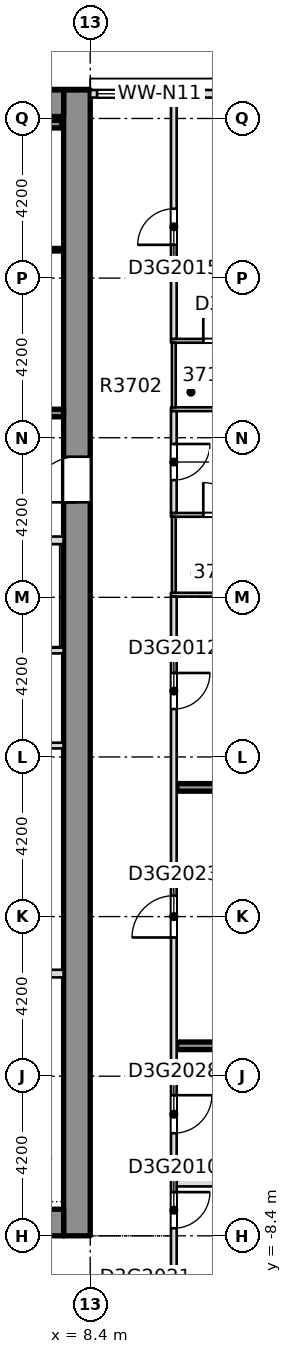
"""IFC4 building model, lengths in metres.
Left out: names, types, materials, properties, quantities, classifications, styles, units other than length and angle.
Written with IfcOpenShell. Run it as: python <this file> out.ifc"""

import sys

from ifc_helpers import new_model, si_unit, direction, frame, frame_2d, origin, place, context, subcontext, project, spatial, rectangle, extrude, element, fill, save


model = new_model("IFC4")
c1 = context("Model", 3, precision=1e-05, world=origin(), true_north=direction((0.0, 1.0)))
c2 = subcontext(c1, "Body", "Model", "MODEL_VIEW")
j1 = project(units=[si_unit("LENGTHUNIT", "METRE"), si_unit("PLANEANGLEUNIT", "RADIAN")], contexts=[c1])
p1 = place(None, origin())
s1 = spatial("IfcSite", under=j1, at=p1, CompositionType="ELEMENT")
p2 = place(p1, origin())
s2 = spatial("IfcBuilding", under=s1, at=p2, CompositionType="ELEMENT")
p3 = place(p2, frame((0.0, 0.0, 146.9)))
s3 = spatial("IfcBuildingStorey", under=s2, at=p3, CompositionType="ELEMENT", Elevation=146.9)
p4 = place(p3, frame((8.05, -8.4, -0.4), z_axis=(0.0, 0.0, 1.0), x_axis=(0.0, 1.0, 0.0)))
e1 = element("IfcWall", 1, at=p4, inside=s3, PredefinedType="SOLIDWALL", context=c2, shape_type="SweptSolid", body=[
    extrude(rectangle(XDim=30.15, YDim=0.7, at=frame_2d((15.075, 0.0))), origin(), (0.0, 0.0, 1.0), 3.45),
])
p5 = place(p4, frame((19.3, 0.0, 0.4)))
e2 = element("IfcOpeningElement", 2, at=p5, cuts=e1, PredefinedType="OPENING", context=c2, shape_type="SweptSolid", body=[
    extrude(rectangle(XDim=1.2, YDim=2.1, at=frame_2d((0.6, 1.05))), frame((0.0, 0.36, 0.0), z_axis=(0.0, -1.0, 0.0), x_axis=(1.0, 0.0, 0.0)), (0.0, 0.0, 1.0), 0.72),
])
p6 = place(p3, frame((-7.7, -8.05, -0.4), z_axis=(0.0, 0.0, 1.0), x_axis=(1.0, 0.0, 0.0)))
e3 = element("IfcWall", 3, at=p6, inside=s3, PredefinedType="SHEAR", context=c2, shape_type="SweptSolid", body=[
    extrude(rectangle(XDim=15.4, YDim=0.7, at=frame_2d((7.7, 0.0))), origin(), (0.0, 0.0, 1.0), 3.45),
])
p7 = place(p6, frame((2.95, 0.0, 0.4)))
e4 = element("IfcOpeningElement", 4, at=p7, cuts=e3, PredefinedType="OPENING", context=c2, shape_type="SweptSolid", body=[
    extrude(rectangle(XDim=1.8, YDim=2.1, at=frame_2d((0.9, 1.05))), frame((0.0, 0.36, 0.0), z_axis=(0.0, -1.0, 0.0), x_axis=(1.0, 0.0, 0.0)), (0.0, 0.0, 1.0), 0.72),
])
p8 = place(p6, frame((10.65, 0.0, 0.4)))
e5 = element("IfcOpeningElement", 5, at=p8, cuts=e3, PredefinedType="OPENING", context=c2, shape_type="SweptSolid", body=[
    extrude(rectangle(XDim=1.8, YDim=2.1, at=frame_2d((0.9, 1.05))), frame((0.0, 0.36, 0.0), z_axis=(0.0, -1.0, 0.0), x_axis=(1.0, 0.0, 0.0)), (0.0, 0.0, 1.0), 0.72),
])
p9 = place(p3, frame((-7.7, 21.4, -0.4), z_axis=(0.0, 0.0, 1.0), x_axis=(1.0, 0.0, 0.0)))
e6 = element("IfcWall", 6, at=p9, inside=s3, PredefinedType="SHEAR", context=c2, shape_type="SweptSolid", body=[
    extrude(rectangle(XDim=15.4, YDim=0.7, at=frame_2d((7.7, 0.0))), origin(), (0.0, 0.0, 1.0), 3.45),
])
p10 = place(p3, frame((10.675, -7.0, 0.0), z_axis=(0.0, 0.0, 1.0), x_axis=(1.0, 0.0, 0.0)))
e7 = element("IfcWall", 7, at=p10, inside=s3, PredefinedType="PARTITIONING", context=c2, shape_type="SweptSolid", body=[
    extrude(rectangle(XDim=10.875, YDim=0.2, at=frame_2d((5.438, 0.0))), origin(), (0.0, 0.0, 1.0), 3.05),
])
p11 = place(p3, frame((10.675, 3.4, 0.0), z_axis=(0.0, 0.0, 1.0), x_axis=(1.0, 0.0, 0.0)))
e8 = element("IfcWall", 8, at=p11, inside=s3, PredefinedType="SOLIDWALL", context=c2, shape_type="SweptSolid", body=[
    extrude(rectangle(XDim=9.773, YDim=0.2, at=frame_2d((4.886, 0.0))), origin(), (0.0, 0.0, 1.0), 3.05),
])
p12 = place(p3, frame((10.525, 8.47, 0.0), z_axis=(0.0, 0.0, 1.0), x_axis=(1.0, 0.0, 0.0)))
e9 = element("IfcWall", 9, at=p12, inside=s3, PredefinedType="PARTITIONING", context=c2, shape_type="SweptSolid", body=[
    extrude(rectangle(XDim=2.525, YDim=0.1, at=frame_2d((1.263, 0.0))), origin(), (0.0, 0.0, 1.0), 3.05),
])
p13 = place(p3, frame((10.525, 10.57, 0.0), z_axis=(0.0, 0.0, 1.0), x_axis=(1.0, 0.0, 0.0)))
e10 = element("IfcWall", 10, at=p13, inside=s3, PredefinedType="PARTITIONING", context=c2, shape_type="SweptSolid", body=[
    extrude(rectangle(XDim=2.525, YDim=0.1, at=frame_2d((1.263, 0.0))), origin(), (0.0, 0.0, 1.0), 3.05),
])
p14 = place(p13, frame((0.85, 0.0, 0.0)))
e11 = element("IfcOpeningElement", 11, at=p14, cuts=e10, PredefinedType="OPENING", context=c2, shape_type="SweptSolid", body=[
    extrude(rectangle(XDim=0.85, YDim=2.1, at=frame_2d((0.425, 1.05))), frame((0.0, 0.06, 0.0), z_axis=(0.0, -1.0, 0.0), x_axis=(1.0, 0.0, 0.0)), (0.0, 0.0, 1.0), 0.12),
])
p15 = place(p3, frame((10.525, 13.35, 0.0), z_axis=(0.0, 0.0, 1.0), x_axis=(1.0, 0.0, 0.0)))
e12 = element("IfcWall", 12, at=p15, inside=s3, PredefinedType="PARTITIONING", context=c2, shape_type="SweptSolid", body=[
    extrude(rectangle(XDim=2.525, YDim=0.1, at=frame_2d((1.263, 0.0))), origin(), (0.0, 0.0, 1.0), 3.05),
])
p16 = place(p3, frame((10.525, 15.15, 0.0), z_axis=(0.0, 0.0, 1.0), x_axis=(1.0, 0.0, 0.0)))
e13 = element("IfcWall", 13, at=p16, inside=s3, PredefinedType="PARTITIONING", context=c2, shape_type="SweptSolid", body=[
    extrude(rectangle(XDim=2.525, YDim=0.1, at=frame_2d((1.263, 0.0))), origin(), (0.0, 0.0, 1.0), 3.05),
])
p17 = place(p16, frame((0.85, 0.0, 0.0)))
e14 = element("IfcOpeningElement", 14, at=p17, cuts=e13, PredefinedType="OPENING", context=c2, shape_type="SweptSolid", body=[
    extrude(rectangle(XDim=0.85, YDim=2.1, at=frame_2d((0.425, 1.05))), frame((0.0, 0.06, 0.0), z_axis=(0.0, -1.0, 0.0), x_axis=(1.0, 0.0, 0.0)), (0.0, 0.0, 1.0), 0.12),
])
p18 = place(p3, frame((10.6, -10.33, 0.0), z_axis=(0.0, 0.0, 1.0), x_axis=(0.0, 1.0, 0.0)))
e15 = element("IfcWall", 15, at=p18, inside=s3, PredefinedType="PARTITIONING", context=c2, shape_type="SweptSolid", body=[
    extrude(rectangle(XDim=18.75, YDim=0.15, at=frame_2d((9.375, 0.0))), origin(), (0.0, 0.0, 1.0), 3.05),
])
p19 = place(p18, frame((2.13, 0.0, 0.0)))
e16 = element("IfcOpeningElement", 16, at=p19, cuts=e15, PredefinedType="OPENING", context=c2, shape_type="SweptSolid", body=[
    extrude(rectangle(XDim=0.95, YDim=2.1, at=frame_2d((0.475, 1.05))), frame((0.0, 0.085, 0.0), z_axis=(0.0, -1.0, 0.0), x_axis=(1.0, 0.0, 0.0)), (0.0, 0.0, 1.0), 0.17),
])
p20 = place(p18, frame((15.79, 0.0, 0.0)))
e17 = element("IfcOpeningElement", 17, at=p20, cuts=e15, PredefinedType="OPENING", context=c2, shape_type="SweptSolid", body=[
    extrude(rectangle(XDim=0.95, YDim=2.1, at=frame_2d((0.475, 1.05))), frame((0.0, 0.085, 0.0), z_axis=(0.0, -1.0, 0.0), x_axis=(1.0, 0.0, 0.0)), (0.0, 0.0, 1.0), 0.17),
])
p21 = place(p18, frame((9.78, 0.0, 0.0)))
e18 = element("IfcOpeningElement", 18, at=p21, cuts=e15, PredefinedType="OPENING", context=c2, shape_type="SweptSolid", body=[
    extrude(rectangle(XDim=1.1, YDim=2.1, at=frame_2d((0.55, 1.05))), frame((0.0, 0.085, 0.0), z_axis=(0.0, -1.0, 0.0), x_axis=(1.0, 0.0, 0.0)), (0.0, 0.0, 1.0), 0.17),
])
p22 = place(p18, frame((4.63, 0.0, 0.0)))
e19 = element("IfcOpeningElement", 19, at=p22, cuts=e15, PredefinedType="OPENING", context=c2, shape_type="SweptSolid", body=[
    extrude(rectangle(XDim=1.0, YDim=2.1, at=frame_2d((0.5, 1.05))), frame((0.0, 0.085, 0.0), z_axis=(0.0, -1.0, 0.0), x_axis=(1.0, 0.0, 0.0)), (0.0, 0.0, 1.0), 0.17),
])
p23 = place(p3, frame((10.6, 8.52, 0.0), z_axis=(0.0, 0.0, 1.0), x_axis=(0.0, 1.0, 0.0)))
e20 = element("IfcWall", 20, at=p23, inside=s3, PredefinedType="PARTITIONING", context=c2, shape_type="SweptSolid", body=[
    extrude(rectangle(XDim=2.0, YDim=0.1, at=frame_2d((1.0, 0.0))), origin(), (0.0, 0.0, 1.0), 3.05),
])
p24 = place(p3, frame((10.6, 10.62, 0.0), z_axis=(0.0, 0.0, 1.0), x_axis=(0.0, 1.0, 0.0)))
e21 = element("IfcWall", 21, at=p24, inside=s3, PredefinedType="PARTITIONING", context=c2, shape_type="SweptSolid", body=[
    extrude(rectangle(XDim=2.68, YDim=0.15, at=frame_2d((1.34, 0.0))), origin(), (0.0, 0.0, 1.0), 3.05),
])
p25 = place(p24, frame((0.865, 0.0, 0.0)))
e22 = element("IfcOpeningElement", 22, at=p25, cuts=e21, PredefinedType="OPENING", context=c2, shape_type="SweptSolid", body=[
    extrude(rectangle(XDim=0.95, YDim=2.1, at=frame_2d((0.475, 1.05))), frame((0.0, 0.085, 0.0), z_axis=(0.0, -1.0, 0.0), x_axis=(1.0, 0.0, 0.0)), (0.0, 0.0, 1.0), 0.17),
])
p26 = place(p3, frame((10.6, 13.4, 0.0), z_axis=(0.0, 0.0, 1.0), x_axis=(0.0, 1.0, 0.0)))
e23 = element("IfcWall", 23, at=p26, inside=s3, PredefinedType="PARTITIONING", context=c2, shape_type="SweptSolid", body=[
    extrude(rectangle(XDim=1.7, YDim=0.1, at=frame_2d((0.85, 0.0))), origin(), (0.0, 0.0, 1.0), 3.05),
])
p27 = place(p3, frame((10.6, 15.2, 0.0), z_axis=(0.0, 0.0, 1.0), x_axis=(0.0, 1.0, 0.0)))
e24 = element("IfcWall", 24, at=p27, inside=s3, PredefinedType="PARTITIONING", context=c2, shape_type="SweptSolid", body=[
    extrude(rectangle(XDim=6.35, YDim=0.15, at=frame_2d((3.175, 0.0))), origin(), (0.0, 0.0, 1.0), 3.05),
])
p28 = place(p27, frame((2.475, 0.0, 0.0)))
e25 = element("IfcOpeningElement", 25, at=p28, cuts=e24, PredefinedType="OPENING", context=c2, shape_type="SweptSolid", body=[
    extrude(rectangle(XDim=0.95, YDim=2.1, at=frame_2d((0.475, 1.05))), frame((0.0, 0.085, 0.0), z_axis=(0.0, -1.0, 0.0), x_axis=(1.0, 0.0, 0.0)), (0.0, 0.0, 1.0), 0.17),
])
p29 = place(p3, frame((12.05, 21.65, 0.0), z_axis=(0.0, 0.0, 1.0), x_axis=(-1.0, 0.0, 0.0)))
e26 = element("IfcWall", 26, at=p29, inside=s3, PredefinedType="STANDARD", context=c2, shape_type="SweptSolid", body=[
    extrude(rectangle(XDim=3.65, YDim=0.2, at=frame_2d((1.825, 0.0))), origin(), (0.0, 0.0, 1.0), 3.05),
])
p30 = place(p29, frame((1.67, 0.0, 0.2)))
e27 = element("IfcOpeningElement", 27, at=p30, cuts=e26, PredefinedType="OPENING", context=c2, shape_type="SweptSolid", body=[
    extrude(rectangle(XDim=1.8, YDim=2.65, at=frame_2d((0.9, 1.325))), frame((0.0, 0.11, 0.0), z_axis=(0.0, -1.0, 0.0), x_axis=(1.0, 0.0, 0.0)), (0.0, 0.0, 1.0), 0.22),
])
p31 = place(p3, frame((5.575, -1.5, 0.0), z_axis=(0.0, 0.0, 1.0), x_axis=(1.0, 0.0, 0.0)))
e28 = element("IfcWall", 28, at=p31, inside=s3, PredefinedType="PARTITIONING", context=c2, shape_type="SweptSolid", body=[
    extrude(rectangle(XDim=2.124, YDim=0.2, at=frame_2d((1.062, 0.0))), origin(), (0.0, 0.0, 1.0), 3.05),
])
p32 = place(p3, frame((5.425, 4.5, 0.0), z_axis=(0.0, 0.0, 1.0), x_axis=(1.0, 0.0, 0.0)))
e29 = element("IfcWall", 29, at=p32, inside=s3, PredefinedType="PARTITIONING", context=c2, shape_type="SweptSolid", body=[
    extrude(rectangle(XDim=2.274, YDim=0.15, at=frame_2d((1.137, 0.0))), origin(), (0.0, 0.0, 1.0), 3.05),
])
p33 = place(p3, frame((-7.699, 7.0, 0.0), z_axis=(0.0, 0.0, 1.0), x_axis=(1.0, 0.0, 0.0)))
e30 = element("IfcWall", 30, at=p33, inside=s3, PredefinedType="PARTITIONING", context=c2, shape_type="SweptSolid", body=[
    extrude(rectangle(XDim=15.398, YDim=0.15, at=frame_2d((7.699, 0.0))), origin(), (0.0, 0.0, 1.0), 3.05),
])
p34 = place(p33, frame((6.999, 0.0, 0.0)))
e31 = element("IfcOpeningElement", 31, at=p34, cuts=e30, PredefinedType="OPENING", context=c2, shape_type="SweptSolid", body=[
    extrude(rectangle(XDim=1.4, YDim=2.1, at=frame_2d((0.7, 1.05))), frame((0.0, 0.085, 0.0), z_axis=(0.0, -1.0, 0.0), x_axis=(1.0, 0.0, 0.0)), (0.0, 0.0, 1.0), 0.17),
])
p35 = place(p3, frame((3.6, 9.9, 0.0), z_axis=(0.0, 0.0, 1.0), x_axis=(1.0, 0.0, 0.0)))
e32 = element("IfcWall", 32, at=p35, inside=s3, PredefinedType="PARTITIONING", context=c2, shape_type="SweptSolid", body=[
    extrude(rectangle(XDim=4.099, YDim=0.2, at=frame_2d((2.049, 0.0))), origin(), (0.0, 0.0, 1.0), 3.05),
])
p36 = place(p35, frame((2.25, 0.0, 0.0)))
e33 = element("IfcOpeningElement", 33, at=p36, cuts=e32, PredefinedType="OPENING", context=c2, shape_type="SweptSolid", body=[
    extrude(rectangle(XDim=1.1, YDim=2.1, at=frame_2d((0.55, 1.05))), frame((0.0, 0.11, 0.0), z_axis=(0.0, -1.0, 0.0), x_axis=(1.0, 0.0, 0.0)), (0.0, 0.0, 1.0), 0.22),
])
p37 = place(p3, frame((3.425, 13.25, 0.0), z_axis=(0.0, 0.0, 1.0), x_axis=(1.0, 0.0, 0.0)))
e34 = element("IfcWall", 34, at=p37, inside=s3, PredefinedType="SOLIDWALL", context=c2, shape_type="SweptSolid", body=[
    extrude(rectangle(XDim=4.274, YDim=0.2, at=frame_2d((2.137, 0.0))), origin(), (0.0, 0.0, 1.0), 3.05),
])
p38 = place(p37, frame((1.825, 0.0, 0.0)))
e35 = element("IfcOpeningElement", 35, at=p38, cuts=e34, PredefinedType="OPENING", context=c2, shape_type="SweptSolid", body=[
    extrude(rectangle(XDim=1.2, YDim=2.1, at=frame_2d((0.6, 1.05))), frame((0.0, 0.11, 0.0), z_axis=(0.0, -1.0, 0.0), x_axis=(1.0, 0.0, 0.0)), (0.0, 0.0, 1.0), 0.22),
])
p39 = place(p3, frame((4.1, 20.85, 0.0), z_axis=(0.0, 0.0, 1.0), x_axis=(1.0, 0.0, 0.0)))
e36 = element("IfcWall", 36, at=p39, inside=s3, PredefinedType="SOLIDWALL", context=c2, shape_type="SweptSolid", body=[
    extrude(rectangle(XDim=3.55, YDim=0.2, at=frame_2d((1.775, 0.0))), origin(), (0.0, 0.0, 1.0), 3.05),
])
p40 = place(p3, frame((10.675, -3.4, 0.0), z_axis=(0.0, 0.0, 1.0), x_axis=(1.0, 0.0, 0.0)))
e37 = element("IfcWall", 37, at=p40, inside=s3, PredefinedType="SOLIDWALL", context=c2, shape_type="SweptSolid", body=[
    extrude(rectangle(XDim=10.875, YDim=0.2, at=frame_2d((5.438, 0.0))), origin(), (0.0, 0.0, 1.0), 3.05),
])
p41 = place(p19, origin())
e38 = element("IfcDoor", 38, at=p41, inside=s3, OperationType="SINGLE_SWING_LEFT", PredefinedType="DOOR", context=c2, shape_type="SweptSolid", body=[
    extrude(rectangle(XDim=0.95, YDim=2.1, at=frame_2d((0.475, 1.05))), frame((0.0, 0.025, 0.0), z_axis=(0.0, -1.0, 0.0), x_axis=(1.0, 0.0, 0.0)), (0.0, 0.0, 1.0), 0.05),
])
fill(e16, e38)
p42 = place(p20, origin())
e39 = element("IfcDoor", 39, at=p42, inside=s3, OperationType="SINGLE_SWING_RIGHT", PredefinedType="DOOR", context=c2, shape_type="SweptSolid", body=[
    extrude(rectangle(XDim=0.95, YDim=2.1, at=frame_2d((0.475, 1.05))), frame((0.0, 0.025, 0.0), z_axis=(0.0, -1.0, 0.0), x_axis=(1.0, 0.0, 0.0)), (0.0, 0.0, 1.0), 0.05),
])
fill(e17, e39)
p43 = place(p25, origin())
e40 = element("IfcDoor", 40, at=p43, inside=s3, OperationType="SINGLE_SWING_RIGHT", PredefinedType="DOOR", context=c2, shape_type="SweptSolid", body=[
    extrude(rectangle(XDim=0.95, YDim=2.1, at=frame_2d((0.475, 1.05))), frame((0.0, 0.025, 0.0), z_axis=(0.0, -1.0, 0.0), x_axis=(1.0, 0.0, 0.0)), (0.0, 0.0, 1.0), 0.05),
])
fill(e22, e40)
p44 = place(p14, origin())
e41 = element("IfcDoor", 41, at=p44, inside=s3, OperationType="SINGLE_SWING_RIGHT", PredefinedType="DOOR", context=c2, shape_type="SweptSolid", body=[
    extrude(rectangle(XDim=0.85, YDim=2.1, at=frame_2d((0.425, 1.05))), frame((0.0, 0.025, 0.0), z_axis=(0.0, -1.0, 0.0), x_axis=(1.0, 0.0, 0.0)), (0.0, 0.0, 1.0), 0.05),
])
fill(e11, e41)
p45 = place(p28, origin())
e42 = element("IfcDoor", 42, at=p45, inside=s3, OperationType="SINGLE_SWING_LEFT", PredefinedType="DOOR", context=c2, shape_type="SweptSolid", body=[
    extrude(rectangle(XDim=0.95, YDim=2.1, at=frame_2d((0.475, 1.05))), frame((0.0, 0.025, 0.0), z_axis=(0.0, -1.0, 0.0), x_axis=(1.0, 0.0, 0.0)), (0.0, 0.0, 1.0), 0.05),
])
fill(e25, e42)
p46 = place(p17, origin())
e43 = element("IfcDoor", 43, at=p46, inside=s3, OperationType="SINGLE_SWING_RIGHT", PredefinedType="DOOR", context=c2, shape_type="SweptSolid", body=[
    extrude(rectangle(XDim=0.85, YDim=2.1, at=frame_2d((0.425, 1.05))), frame((0.0, 0.025, 0.0), z_axis=(0.0, -1.0, 0.0), x_axis=(1.0, 0.0, 0.0)), (0.0, 0.0, 1.0), 0.05),
])
fill(e14, e43)
p47 = place(p21, origin())
e44 = element("IfcDoor", 44, at=p47, inside=s3, OperationType="SINGLE_SWING_LEFT", PredefinedType="DOOR", context=c2, shape_type="SweptSolid", body=[
    extrude(rectangle(XDim=1.1, YDim=2.1, at=frame_2d((0.55, 1.05))), frame((0.0, 0.025, 0.0), z_axis=(0.0, -1.0, 0.0), x_axis=(1.0, 0.0, 0.0)), (0.0, 0.0, 1.0), 0.05),
])
fill(e18, e44)
p48 = place(p22, origin())
e45 = element("IfcDoor", 45, at=p48, inside=s3, OperationType="SINGLE_SWING_RIGHT", PredefinedType="DOOR", context=c2, shape_type="SweptSolid", body=[
    extrude(rectangle(XDim=1.0, YDim=2.1, at=frame_2d((0.5, 1.05))), frame((0.0, 0.025, 0.0), z_axis=(0.0, -1.0, 0.0), x_axis=(1.0, 0.0, 0.0)), (0.0, 0.0, 1.0), 0.05),
])
fill(e19, e45)
p49 = place(p30, origin())
e46 = element("IfcWindow", 46, at=p49, inside=s3, PartitioningType="SINGLE_PANEL", PredefinedType="WINDOW", context=c2, shape_type="SweptSolid", body=[
    extrude(rectangle(XDim=1.8, YDim=2.65, at=frame_2d((0.9, 1.325))), frame((0.0, 0.03, 0.0), z_axis=(0.0, -1.0, 0.0), x_axis=(1.0, 0.0, 0.0)), (0.0, 0.0, 1.0), 0.06),
])
fill(e27, e46)
p50 = place(p5, origin())
e47 = element("IfcDoor", 47, at=p50, inside=s3, OperationType="SINGLE_SWING_LEFT", PredefinedType="DOOR", context=c2, shape_type="SweptSolid", body=[
    extrude(rectangle(XDim=1.2, YDim=2.1, at=frame_2d((0.6, 1.05))), frame((0.0, 0.025, 0.0), z_axis=(0.0, -1.0, 0.0), x_axis=(1.0, 0.0, 0.0)), (0.0, 0.0, 1.0), 0.05),
])
fill(e2, e47)
save(model, sys.argv[1])
